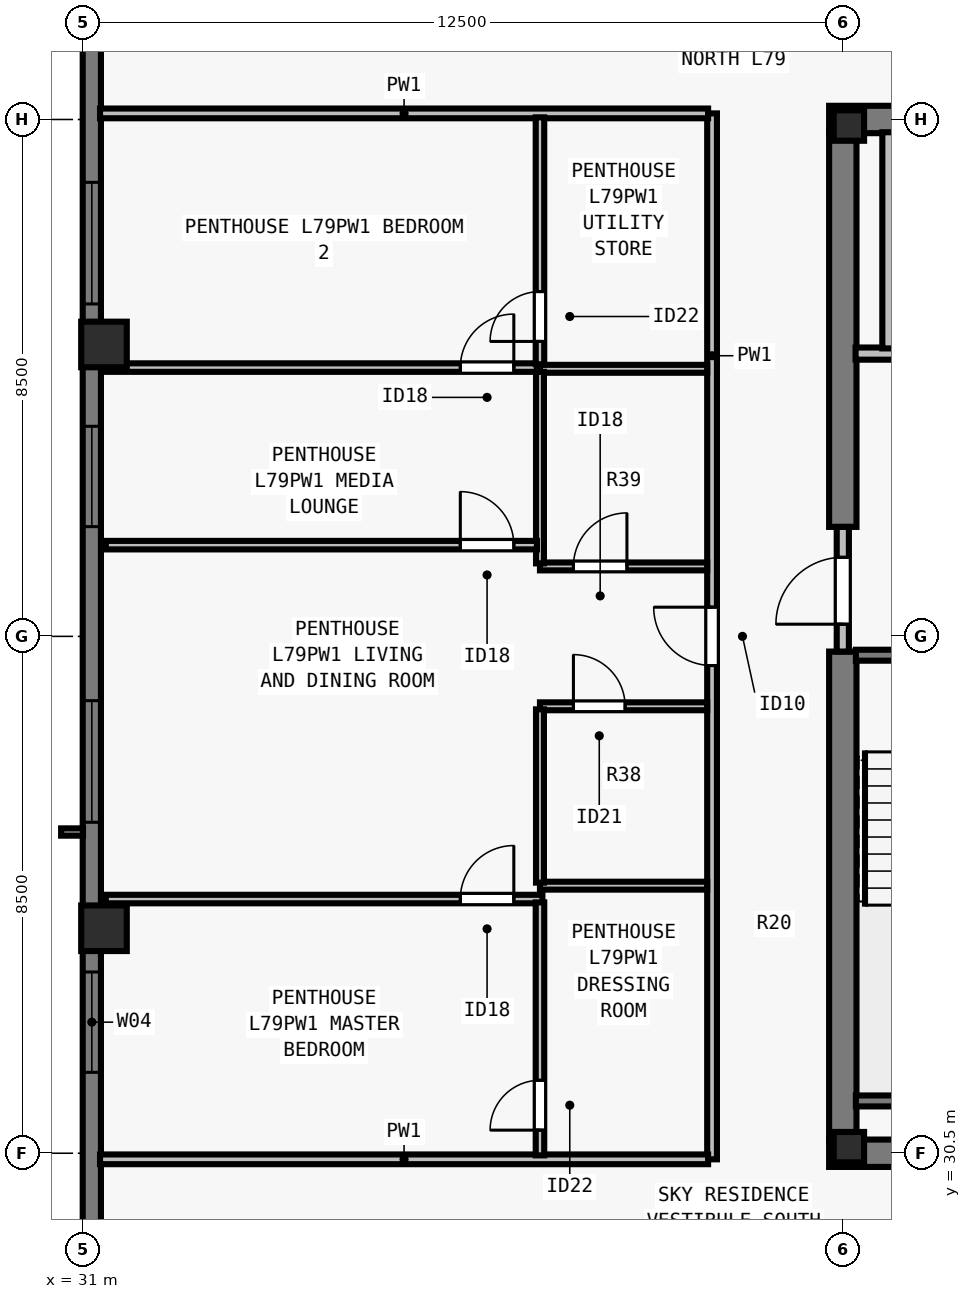
"""IFC4 building model, lengths in metres.
Left out: names, types, materials, properties, quantities, classifications, styles, units other than length and angle.
Written with IfcOpenShell. Run it as: python <this file> out.ifc"""

import sys

from ifc_helpers import new_model, si_unit, direction, frame, frame_2d, origin, origin_2d, place, context, subcontext, project, spatial, rectangle, i_section, extrude, element, fill, save


model = new_model("IFC4")
c1 = context("Model", 3, precision=1e-05, world=origin(), true_north=direction((0.0, 1.0)))
c2 = subcontext(c1, "Body", "Model", "MODEL_VIEW")
j1 = project(units=[si_unit("LENGTHUNIT", "METRE"), si_unit("PLANEANGLEUNIT", "RADIAN")], contexts=[c1])
p1 = place(None, origin())
s1 = spatial("IfcSite", under=j1, at=p1, CompositionType="ELEMENT")
p2 = place(p1, origin())
s2 = spatial("IfcBuilding", under=s1, at=p2, CompositionType="ELEMENT")
p3 = place(p2, frame((0.0, 0.0, 287.5)))
s3 = spatial("IfcBuildingStorey", under=s2, at=p3, CompositionType="ELEMENT", Elevation=287.5)
for number, where, z_axis, x_axis in (
    (1, (43.6, 30.6, 0.0), (0.0, 0.0, 1.0), (1.0, 0.0, 0.0)),
    (2, (43.6, 47.4, 0.0), (0.0, 0.0, 1.0), (1.0, 0.0, 0.0)),
):
    element("IfcColumn", number, at=place(p3, frame(where, z_axis=z_axis, x_axis=x_axis)), inside=s3, PredefinedType="COLUMN", context=c2, shape_type="SweptSolid", body=[
        extrude(i_section(OverallWidth=0.5, OverallDepth=0.5, WebThickness=0.028, FlangeThickness=0.045, at=origin_2d()), origin(), (0.0, 0.0, 1.0), 3.5),
    ])
for number, where, z_axis, x_axis in (
    (3, (31.35, 43.8, 0.0), (0.0, 0.0, 1.0), (0.0, 1.0, 0.0)),
    (4, (31.35, 34.2, 0.0), (0.0, 0.0, 1.0), (0.0, 1.0, 0.0)),
):
    element("IfcColumn", number, at=place(p3, frame(where, z_axis=z_axis, x_axis=x_axis)), inside=s3, PredefinedType="COLUMN", context=c2, shape_type="SweptSolid", body=[
        extrude(rectangle(XDim=0.75, YDim=0.75, at=origin_2d()), origin(), (0.0, 0.0, 1.0), 3.5),
    ])
p4 = place(p3, frame((31.15, 23.5, 0.0), z_axis=(0.0, 0.0, 1.0), x_axis=(0.0, 1.0, 0.0)))
e5 = element("IfcWall", 5, at=p4, inside=s3, PredefinedType="SOLIDWALL", context=c2, shape_type="SweptSolid", body=[
    extrude(rectangle(XDim=30.722, YDim=0.3, at=frame_2d((15.361, 0.0))), origin(), (0.0, 0.0, 1.0), 3.29),
])
p5 = place(p4, frame((8.331, 0.0, 0.8)))
e6 = element("IfcOpeningElement", 6, at=p5, cuts=e5, PredefinedType="OPENING", context=c2, shape_type="SweptSolid", body=[
    extrude(rectangle(XDim=1.65, YDim=1.758, at=frame_2d((0.825, 0.879))), frame((0.0, 0.16, 0.0), z_axis=(0.0, -1.0, 0.0), x_axis=(1.0, 0.0, 0.0)), (0.0, 0.0, 1.0), 0.32),
])
p6 = place(p4, frame((12.442, 0.0, 0.8)))
e7 = element("IfcOpeningElement", 7, at=p6, cuts=e5, PredefinedType="OPENING", context=c2, shape_type="SweptSolid", body=[
    extrude(rectangle(XDim=2.0, YDim=1.758, at=frame_2d((1.0, 0.879))), frame((0.0, 0.16, 0.0), z_axis=(0.0, -1.0, 0.0), x_axis=(1.0, 0.0, 0.0)), (0.0, 0.0, 1.0), 0.32),
])
p7 = place(p4, frame((17.304, 0.0, 0.8)))
e8 = element("IfcOpeningElement", 8, at=p7, cuts=e5, PredefinedType="OPENING", context=c2, shape_type="SweptSolid", body=[
    extrude(rectangle(XDim=1.65, YDim=1.758, at=frame_2d((0.825, 0.879))), frame((0.0, 0.16, 0.0), z_axis=(0.0, -1.0, 0.0), x_axis=(1.0, 0.0, 0.0)), (0.0, 0.0, 1.0), 0.32),
])
p8 = place(p4, frame((20.967, 0.0, 0.8)))
e9 = element("IfcOpeningElement", 9, at=p8, cuts=e5, PredefinedType="OPENING", context=c2, shape_type="SweptSolid", body=[
    extrude(rectangle(XDim=2.0, YDim=1.758, at=frame_2d((1.0, 0.879))), frame((0.0, 0.16, 0.0), z_axis=(0.0, -1.0, 0.0), x_axis=(1.0, 0.0, 0.0)), (0.0, 0.0, 1.0), 0.32),
])
p9 = place(p4, frame((26.63, 0.0, 0.8)))
e10 = element("IfcOpeningElement", 10, at=p9, cuts=e5, PredefinedType="OPENING", context=c2, shape_type="SweptSolid", body=[
    extrude(rectangle(XDim=0.9, YDim=1.75, at=frame_2d((0.45, 0.875))), frame((0.0, 0.16, 0.0), z_axis=(0.0, -1.0, 0.0), x_axis=(1.0, 0.0, 0.0)), (0.0, 0.0, 1.0), 0.32),
])
for number, where, z_axis, x_axis in (
    (11, (43.275, 30.5, 0.0), (0.0, 0.0, 1.0), (1.0, 0.0, 0.0)),
    (12, (43.275, 47.5, 0.0), (0.0, 0.0, 1.0), (1.0, 0.0, 0.0)),
):
    element("IfcWall", number, at=place(p3, frame(where, z_axis=z_axis, x_axis=x_axis)), inside=s3, PredefinedType="SHEAR", context=c2, shape_type="SweptSolid", body=[
        extrude(rectangle(XDim=17.45, YDim=0.45, at=frame_2d((8.725, 0.0))), origin(), (0.0, 0.0, 1.0), 3.29),
    ])
p10 = place(p3, frame((43.5, 30.715, 0.0), z_axis=(0.0, 0.0, 1.0), x_axis=(0.0, 1.0, 0.0)))
e13 = element("IfcWall", 13, at=p10, inside=s3, PredefinedType="SHEAR", context=c2, shape_type="SweptSolid", body=[
    extrude(rectangle(XDim=8.035, YDim=0.45, at=frame_2d((4.018, 0.0))), origin(), (0.0, 0.0, 1.0), 3.29),
])
p11 = place(p3, frame((43.5, 40.8, 0.0), z_axis=(0.0, 0.0, 1.0), x_axis=(0.0, 1.0, 0.0)))
e14 = element("IfcWall", 14, at=p11, inside=s3, PredefinedType="SHEAR", context=c2, shape_type="SweptSolid", body=[
    extrude(rectangle(XDim=6.485, YDim=0.45, at=frame_2d((3.242, 0.0))), origin(), (0.0, 0.0, 1.0), 3.29),
])
p12 = place(p3, frame((43.5, 38.75, 0.0), z_axis=(0.0, 0.0, 1.0), x_axis=(0.0, 1.0, 0.0)))
e15 = element("IfcWall", 15, at=p12, inside=s3, PredefinedType="SOLIDWALL", context=c2, shape_type="SweptSolid", body=[
    extrude(rectangle(XDim=2.05, YDim=0.2, at=frame_2d((1.025, 0.0))), origin(), (0.0, 0.0, 1.0), 3.29),
])
p13 = place(p12, frame((0.45, 0.0, 0.0)))
e16 = element("IfcOpeningElement", 16, at=p13, cuts=e15, PredefinedType="OPENING", context=c2, shape_type="SweptSolid", body=[
    extrude(rectangle(XDim=1.1, YDim=2.15, at=frame_2d((0.55, 1.075))), frame((0.0, 0.11, 0.0), z_axis=(0.0, -1.0, 0.0), x_axis=(1.0, 0.0, 0.0)), (0.0, 0.0, 1.0), 0.22),
])
p14 = place(p3, frame((43.71, 43.65, 0.0), z_axis=(0.0, 0.0, 1.0), x_axis=(1.0, 0.0, 0.0)))
e17 = element("IfcWall", 17, at=p14, inside=s3, PredefinedType="SOLIDWALL", context=c2, shape_type="SweptSolid", body=[
    extrude(rectangle(XDim=3.555, YDim=0.2, at=frame_2d((1.777, 0.0))), origin(), (0.0, 0.0, 1.0), 3.29),
])
p15 = place(p14, frame((1.16, 0.0, 0.0)))
e18 = element("IfcOpeningElement", 18, at=p15, cuts=e17, PredefinedType="OPENING", context=c2, shape_type="SweptSolid", body=[
    extrude(rectangle(XDim=1.1, YDim=2.2, at=frame_2d((0.55, 1.1))), frame((0.0, 0.11, 0.0), z_axis=(0.0, -1.0, 0.0), x_axis=(1.0, 0.0, 0.0)), (0.0, 0.0, 1.0), 0.22),
])
p16 = place(p3, frame((44.25, 43.735, 0.0), z_axis=(0.0, 0.0, 1.0), x_axis=(0.0, 1.0, 0.0)))
e19 = element("IfcWall", 19, at=p16, inside=s3, PredefinedType="SOLIDWALL", context=c2, shape_type="SweptSolid", body=[
    extrude(rectangle(XDim=3.555, YDim=0.2, at=frame_2d((1.777, 0.0))), origin(), (0.0, 0.0, 1.0), 3.29),
])
p17 = place(p3, frame((41.35, 30.4, 0.0), z_axis=(0.0, 0.0, 1.0), x_axis=(0.0, 1.0, 0.0)))
e20 = element("IfcWall", 20, at=p17, inside=s3, PredefinedType="PARTITIONING", context=c2, shape_type="SweptSolid", body=[
    extrude(rectangle(XDim=17.2, YDim=0.16, at=frame_2d((8.6, 0.0))), origin(), (0.0, 0.0, 1.0), 3.009),
])
p18 = place(p17, frame((8.12, 0.0, 0.0)))
e21 = element("IfcOpeningElement", 21, at=p18, cuts=e20, PredefinedType="OPENING", context=c2, shape_type="SweptSolid", body=[
    extrude(rectangle(XDim=0.96, YDim=2.18, at=frame_2d((0.48, 1.09))), frame((0.0, 0.09, 0.0), z_axis=(0.0, -1.0, 0.0), x_axis=(1.0, 0.0, 0.0)), (0.0, 0.0, 1.0), 0.18),
])
for number, where, z_axis, x_axis in (
    (22, (31.285, 30.4, 0.0), (0.0, 0.0, 1.0), (1.0, 0.0, 0.0)),
    (23, (31.285, 47.6, 0.0), (0.0, 0.0, 1.0), (1.0, 0.0, 0.0)),
):
    element("IfcWall", number, at=place(p3, frame(where, z_axis=z_axis, x_axis=x_axis)), inside=s3, PredefinedType="PARTITIONING", context=c2, shape_type="SweptSolid", body=[
        extrude(rectangle(XDim=10.0, YDim=0.16, at=frame_2d((5.0, 0.0))), origin(), (0.0, 0.0, 1.0), 3.29),
    ])
p19 = place(p3, frame((38.52, 34.9, 0.0), z_axis=(0.0, 0.0, 1.0), x_axis=(1.0, 0.0, 0.0)))
e24 = element("IfcWall", 24, at=p19, inside=s3, PredefinedType="PLUMBINGWALL", context=c2, shape_type="SweptSolid", body=[
    extrude(rectangle(XDim=2.75, YDim=0.13, at=frame_2d((1.375, 0.0))), origin(), (0.0, 0.0, 1.0), 3.29),
])
p20 = place(p3, frame((38.52, 37.85, 0.0), z_axis=(0.0, 0.0, 1.0), x_axis=(1.0, 0.0, 0.0)))
e25 = element("IfcWall", 25, at=p20, inside=s3, PredefinedType="PLUMBINGWALL", context=c2, shape_type="SweptSolid", body=[
    extrude(rectangle(XDim=2.75, YDim=0.13, at=frame_2d((1.375, 0.0))), origin(), (0.0, 0.0, 1.0), 3.29),
])
p21 = place(p20, frame((0.55, 0.0, 0.0)))
e26 = element("IfcOpeningElement", 26, at=p21, cuts=e25, PredefinedType="OPENING", context=c2, shape_type="SweptSolid", body=[
    extrude(rectangle(XDim=0.85, YDim=2.08, at=frame_2d((0.425, 1.04))), frame((0.0, 0.075, 0.0), z_axis=(0.0, -1.0, 0.0), x_axis=(1.0, 0.0, 0.0)), (0.0, 0.0, 1.0), 0.15),
])
p22 = place(p3, frame((38.52, 34.95, 0.0), z_axis=(0.0, 0.0, 1.0), x_axis=(0.0, 1.0, 0.0)))
e27 = element("IfcWall", 27, at=p22, inside=s3, PredefinedType="PLUMBINGWALL", context=c2, shape_type="SweptSolid", body=[
    extrude(rectangle(XDim=2.85, YDim=0.13, at=frame_2d((1.425, 0.0))), origin(), (0.0, 0.0, 1.0), 3.29),
])
p23 = place(p3, frame((38.52, 43.4, 0.0), z_axis=(0.0, 0.0, 1.0), x_axis=(1.0, 0.0, 0.0)))
e28 = element("IfcWall", 28, at=p23, inside=s3, PredefinedType="PLUMBINGWALL", context=c2, shape_type="SweptSolid", body=[
    extrude(rectangle(XDim=2.75, YDim=0.13, at=frame_2d((1.375, 0.0))), origin(), (0.0, 0.0, 1.0), 3.29),
])
p24 = place(p3, frame((38.52, 40.15, 0.0), z_axis=(0.0, 0.0, 1.0), x_axis=(1.0, 0.0, 0.0)))
e29 = element("IfcWall", 29, at=p24, inside=s3, PredefinedType="PLUMBINGWALL", context=c2, shape_type="SweptSolid", body=[
    extrude(rectangle(XDim=2.75, YDim=0.13, at=frame_2d((1.375, 0.0))), origin(), (0.0, 0.0, 1.0), 3.29),
])
p25 = place(p24, frame((0.55, 0.0, 0.0)))
e30 = element("IfcOpeningElement", 30, at=p25, cuts=e29, PredefinedType="OPENING", context=c2, shape_type="SweptSolid", body=[
    extrude(rectangle(XDim=0.88, YDim=2.1, at=frame_2d((0.44, 1.05))), frame((0.0, 0.075, 0.0), z_axis=(0.0, -1.0, 0.0), x_axis=(1.0, 0.0, 0.0)), (0.0, 0.0, 1.0), 0.15),
])
p26 = place(p3, frame((38.52, 40.2, 0.0), z_axis=(0.0, 0.0, 1.0), x_axis=(0.0, 1.0, 0.0)))
e31 = element("IfcWall", 31, at=p26, inside=s3, PredefinedType="PLUMBINGWALL", context=c2, shape_type="SweptSolid", body=[
    extrude(rectangle(XDim=3.15, YDim=0.13, at=frame_2d((1.575, 0.0))), origin(), (0.0, 0.0, 1.0), 3.009),
])
p27 = place(p3, frame((31.38, 34.68, 0.0), z_axis=(0.0, 0.0, 1.0), x_axis=(1.0, 0.0, 0.0)))
e32 = element("IfcWall", 32, at=p27, inside=s3, PredefinedType="PARTITIONING", context=c2, shape_type="SweptSolid", body=[
    extrude(rectangle(XDim=7.18, YDim=0.14, at=frame_2d((3.59, 0.0))), origin(), (0.0, 0.0, 1.0), 3.29),
])
p28 = place(p27, frame((5.83, 0.0, 0.0)))
e33 = element("IfcOpeningElement", 33, at=p28, cuts=e32, PredefinedType="OPENING", context=c2, shape_type="SweptSolid", body=[
    extrude(rectangle(XDim=0.88, YDim=2.1, at=frame_2d((0.44, 1.05))), frame((0.0, 0.08, 0.0), z_axis=(0.0, -1.0, 0.0), x_axis=(1.0, 0.0, 0.0)), (0.0, 0.0, 1.0), 0.16),
])
p29 = place(p3, frame((38.52, 30.465, 0.0), z_axis=(0.0, 0.0, 1.0), x_axis=(0.0, 1.0, 0.0)))
e34 = element("IfcWall", 34, at=p29, inside=s3, PredefinedType="PARTITIONING", context=c2, shape_type="SweptSolid", body=[
    extrude(rectangle(XDim=4.16, YDim=0.14, at=frame_2d((2.08, 0.0))), origin(), (0.0, 0.0, 1.0), 3.29),
])
p30 = place(p29, frame((0.415, 0.0, 0.0)))
e35 = element("IfcOpeningElement", 35, at=p30, cuts=e34, PredefinedType="OPENING", context=c2, shape_type="SweptSolid", body=[
    extrude(rectangle(XDim=0.82, YDim=2.1, at=frame_2d((0.41, 1.05))), frame((0.0, 0.08, 0.0), z_axis=(0.0, -1.0, 0.0), x_axis=(1.0, 0.0, 0.0)), (0.0, 0.0, 1.0), 0.16),
])
p31 = place(p3, frame((31.38, 43.42, 0.0), z_axis=(0.0, 0.0, 1.0), x_axis=(1.0, 0.0, 0.0)))
e36 = element("IfcWall", 36, at=p31, inside=s3, PredefinedType="PARTITIONING", context=c2, shape_type="SweptSolid", body=[
    extrude(rectangle(XDim=7.09, YDim=0.14, at=frame_2d((3.545, 0.0))), origin(), (0.0, 0.0, 1.0), 3.29),
])
p32 = place(p31, frame((5.83, 0.0, 0.0)))
e37 = element("IfcOpeningElement", 37, at=p32, cuts=e36, PredefinedType="OPENING", context=c2, shape_type="SweptSolid", body=[
    extrude(rectangle(XDim=0.88, YDim=2.1, at=frame_2d((0.44, 1.05))), frame((0.0, 0.08, 0.0), z_axis=(0.0, -1.0, 0.0), x_axis=(1.0, 0.0, 0.0)), (0.0, 0.0, 1.0), 0.16),
])
p33 = place(p3, frame((38.52, 43.475, 0.0), z_axis=(0.0, 0.0, 1.0), x_axis=(0.0, 1.0, 0.0)))
e38 = element("IfcWall", 38, at=p33, inside=s3, PredefinedType="PARTITIONING", context=c2, shape_type="SweptSolid", body=[
    extrude(rectangle(XDim=4.06, YDim=0.14, at=frame_2d((2.03, 0.0))), origin(), (0.0, 0.0, 1.0), 3.29),
])
p34 = place(p33, frame((0.375, 0.0, 0.0)))
e39 = element("IfcOpeningElement", 39, at=p34, cuts=e38, PredefinedType="OPENING", context=c2, shape_type="SweptSolid", body=[
    extrude(rectangle(XDim=0.82, YDim=2.1, at=frame_2d((0.41, 1.05))), frame((0.0, 0.08, 0.0), z_axis=(0.0, -1.0, 0.0), x_axis=(1.0, 0.0, 0.0)), (0.0, 0.0, 1.0), 0.16),
])
p35 = place(p3, frame((31.38, 40.5, 0.0), z_axis=(0.0, 0.0, 1.0), x_axis=(1.0, 0.0, 0.0)))
e40 = element("IfcWall", 40, at=p35, inside=s3, PredefinedType="PARTITIONING", context=c2, shape_type="SweptSolid", body=[
    extrude(rectangle(XDim=7.09, YDim=0.14, at=frame_2d((3.545, 0.0))), origin(), (0.0, 0.0, 1.0), 3.29),
])
p36 = place(p35, frame((5.83, 0.0, 0.0)))
e41 = element("IfcOpeningElement", 41, at=p36, cuts=e40, PredefinedType="OPENING", context=c2, shape_type="SweptSolid", body=[
    extrude(rectangle(XDim=0.88, YDim=2.1, at=frame_2d((0.44, 1.05))), frame((0.0, 0.08, 0.0), z_axis=(0.0, -1.0, 0.0), x_axis=(1.0, 0.0, 0.0)), (0.0, 0.0, 1.0), 0.16),
])
p37 = place(p3, frame((43.715, 38.69, 0.0), z_axis=(0.0, 0.0, 1.0), x_axis=(1.0, 0.0, 0.0)))
e42 = element("IfcWall", 42, at=p37, inside=s3, PredefinedType="SOLIDWALL", context=c2, shape_type="SweptSolid", body=[
    extrude(rectangle(XDim=3.28, YDim=0.18, at=frame_2d((1.64, 0.0))), origin(), (0.0, 0.0, 1.0), 3.29),
])
p38 = place(p37, frame((1.165, 0.0, 0.0)))
e43 = element("IfcOpeningElement", 43, at=p38, cuts=e42, PredefinedType="OPENING", context=c2, shape_type="SweptSolid", body=[
    extrude(rectangle(XDim=0.95, YDim=2.15, at=frame_2d((0.475, 1.075))), frame((0.0, 0.1, 0.0), z_axis=(0.0, -1.0, 0.0), x_axis=(1.0, 0.0, 0.0)), (0.0, 0.0, 1.0), 0.2),
])
p39 = place(p3, frame((43.715, 31.36, 0.0), z_axis=(0.0, 0.0, 1.0), x_axis=(1.0, 0.0, 0.0)))
e44 = element("IfcWall", 44, at=p39, inside=s3, PredefinedType="SOLIDWALL", context=c2, shape_type="SweptSolid", body=[
    extrude(rectangle(XDim=3.28, YDim=0.18, at=frame_2d((1.64, 0.0))), origin(), (0.0, 0.0, 1.0), 3.29),
])
p40 = place(p5, origin())
e45 = element("IfcWindow", 45, at=p40, inside=s3, PartitioningType="SINGLE_PANEL", PredefinedType="WINDOW", context=c2, shape_type="SweptSolid", body=[
    extrude(rectangle(XDim=1.65, YDim=1.758, at=frame_2d((0.825, 0.879))), frame((0.0, -0.05, 0.0), z_axis=(0.0, -1.0, 0.0), x_axis=(1.0, 0.0, 0.0)), (0.0, 0.0, 1.0), 0.06),
])
fill(e6, e45)
p41 = place(p6, origin())
e46 = element("IfcWindow", 46, at=p41, inside=s3, PartitioningType="SINGLE_PANEL", PredefinedType="WINDOW", context=c2, shape_type="SweptSolid", body=[
    extrude(rectangle(XDim=2.0, YDim=1.758, at=frame_2d((1.0, 0.879))), frame((0.0, -0.05, 0.0), z_axis=(0.0, -1.0, 0.0), x_axis=(1.0, 0.0, 0.0)), (0.0, 0.0, 1.0), 0.06),
])
fill(e7, e46)
p42 = place(p7, origin())
e47 = element("IfcWindow", 47, at=p42, inside=s3, PartitioningType="SINGLE_PANEL", PredefinedType="WINDOW", context=c2, shape_type="SweptSolid", body=[
    extrude(rectangle(XDim=1.65, YDim=1.758, at=frame_2d((0.825, 0.879))), frame((0.0, -0.05, 0.0), z_axis=(0.0, -1.0, 0.0), x_axis=(1.0, 0.0, 0.0)), (0.0, 0.0, 1.0), 0.06),
])
fill(e8, e47)
p43 = place(p8, origin())
e48 = element("IfcWindow", 48, at=p43, inside=s3, PartitioningType="SINGLE_PANEL", PredefinedType="WINDOW", context=c2, shape_type="SweptSolid", body=[
    extrude(rectangle(XDim=2.0, YDim=1.758, at=frame_2d((1.0, 0.879))), frame((0.0, -0.05, 0.0), z_axis=(0.0, -1.0, 0.0), x_axis=(1.0, 0.0, 0.0)), (0.0, 0.0, 1.0), 0.06),
])
fill(e9, e48)
p44 = place(p13, origin())
e49 = element("IfcDoor", 49, at=p44, inside=s3, OperationType="SINGLE_SWING_LEFT", PredefinedType="DOOR", context=c2, shape_type="SweptSolid", body=[
    extrude(rectangle(XDim=1.1, YDim=2.15, at=frame_2d((0.55, 1.075))), frame((0.0, 0.025, 0.0), z_axis=(0.0, -1.0, 0.0), x_axis=(1.0, 0.0, 0.0)), (0.0, 0.0, 1.0), 0.05),
])
fill(e16, e49)
p45 = place(p21, origin())
e50 = element("IfcDoor", 50, at=p45, inside=s3, OperationType="SINGLE_SWING_LEFT", PredefinedType="DOOR", context=c2, shape_type="SweptSolid", body=[
    extrude(rectangle(XDim=0.85, YDim=2.08, at=frame_2d((0.425, 1.04))), frame((0.0, 0.025, 0.0), z_axis=(0.0, -1.0, 0.0), x_axis=(1.0, 0.0, 0.0)), (0.0, 0.0, 1.0), 0.05),
])
fill(e26, e50)
p46 = place(p25, origin())
e51 = element("IfcDoor", 51, at=p46, inside=s3, OperationType="SINGLE_SWING_RIGHT", PredefinedType="DOOR", context=c2, shape_type="SweptSolid", body=[
    extrude(rectangle(XDim=0.88, YDim=2.1, at=frame_2d((0.44, 1.05))), frame((0.0, 0.025, 0.0), z_axis=(0.0, -1.0, 0.0), x_axis=(1.0, 0.0, 0.0)), (0.0, 0.0, 1.0), 0.05),
])
fill(e30, e51)
p47 = place(p30, origin())
e52 = element("IfcDoor", 52, at=p47, inside=s3, OperationType="SINGLE_SWING_LEFT", PredefinedType="DOOR", context=c2, shape_type="SweptSolid", body=[
    extrude(rectangle(XDim=0.82, YDim=2.1, at=frame_2d((0.41, 1.05))), frame((0.0, 0.025, 0.0), z_axis=(0.0, -1.0, 0.0), x_axis=(1.0, 0.0, 0.0)), (0.0, 0.0, 1.0), 0.05),
])
fill(e35, e52)
p48 = place(p28, origin())
e53 = element("IfcDoor", 53, at=p48, inside=s3, OperationType="SINGLE_SWING_RIGHT", PredefinedType="DOOR", context=c2, shape_type="SweptSolid", body=[
    extrude(rectangle(XDim=0.88, YDim=2.1, at=frame_2d((0.44, 1.05))), frame((0.0, 0.025, 0.0), z_axis=(0.0, -1.0, 0.0), x_axis=(1.0, 0.0, 0.0)), (0.0, 0.0, 1.0), 0.05),
])
fill(e33, e53)
p49 = place(p34, origin())
e54 = element("IfcDoor", 54, at=p49, inside=s3, OperationType="SINGLE_SWING_LEFT", PredefinedType="DOOR", context=c2, shape_type="SweptSolid", body=[
    extrude(rectangle(XDim=0.82, YDim=2.1, at=frame_2d((0.41, 1.05))), frame((0.0, 0.025, 0.0), z_axis=(0.0, -1.0, 0.0), x_axis=(1.0, 0.0, 0.0)), (0.0, 0.0, 1.0), 0.05),
])
fill(e39, e54)
p50 = place(p32, origin())
e55 = element("IfcDoor", 55, at=p50, inside=s3, OperationType="SINGLE_SWING_RIGHT", PredefinedType="DOOR", context=c2, shape_type="SweptSolid", body=[
    extrude(rectangle(XDim=0.88, YDim=2.1, at=frame_2d((0.44, 1.05))), frame((0.0, 0.025, 0.0), z_axis=(0.0, -1.0, 0.0), x_axis=(1.0, 0.0, 0.0)), (0.0, 0.0, 1.0), 0.05),
])
fill(e37, e55)
p51 = place(p36, origin())
e56 = element("IfcDoor", 56, at=p51, inside=s3, OperationType="SINGLE_SWING_LEFT", PredefinedType="DOOR", context=c2, shape_type="SweptSolid", body=[
    extrude(rectangle(XDim=0.88, YDim=2.1, at=frame_2d((0.44, 1.05))), frame((0.0, 0.025, 0.0), z_axis=(0.0, -1.0, 0.0), x_axis=(1.0, 0.0, 0.0)), (0.0, 0.0, 1.0), 0.05),
])
fill(e41, e56)
p52 = place(p18, origin())
e57 = element("IfcDoor", 57, at=p52, inside=s3, OperationType="SINGLE_SWING_RIGHT", PredefinedType="DOOR", context=c2, shape_type="SweptSolid", body=[
    extrude(rectangle(XDim=0.96, YDim=2.18, at=frame_2d((0.48, 1.09))), frame((0.0, 0.025, 0.0), z_axis=(0.0, -1.0, 0.0), x_axis=(1.0, 0.0, 0.0)), (0.0, 0.0, 1.0), 0.05),
])
fill(e21, e57)
save(model, sys.argv[1])
